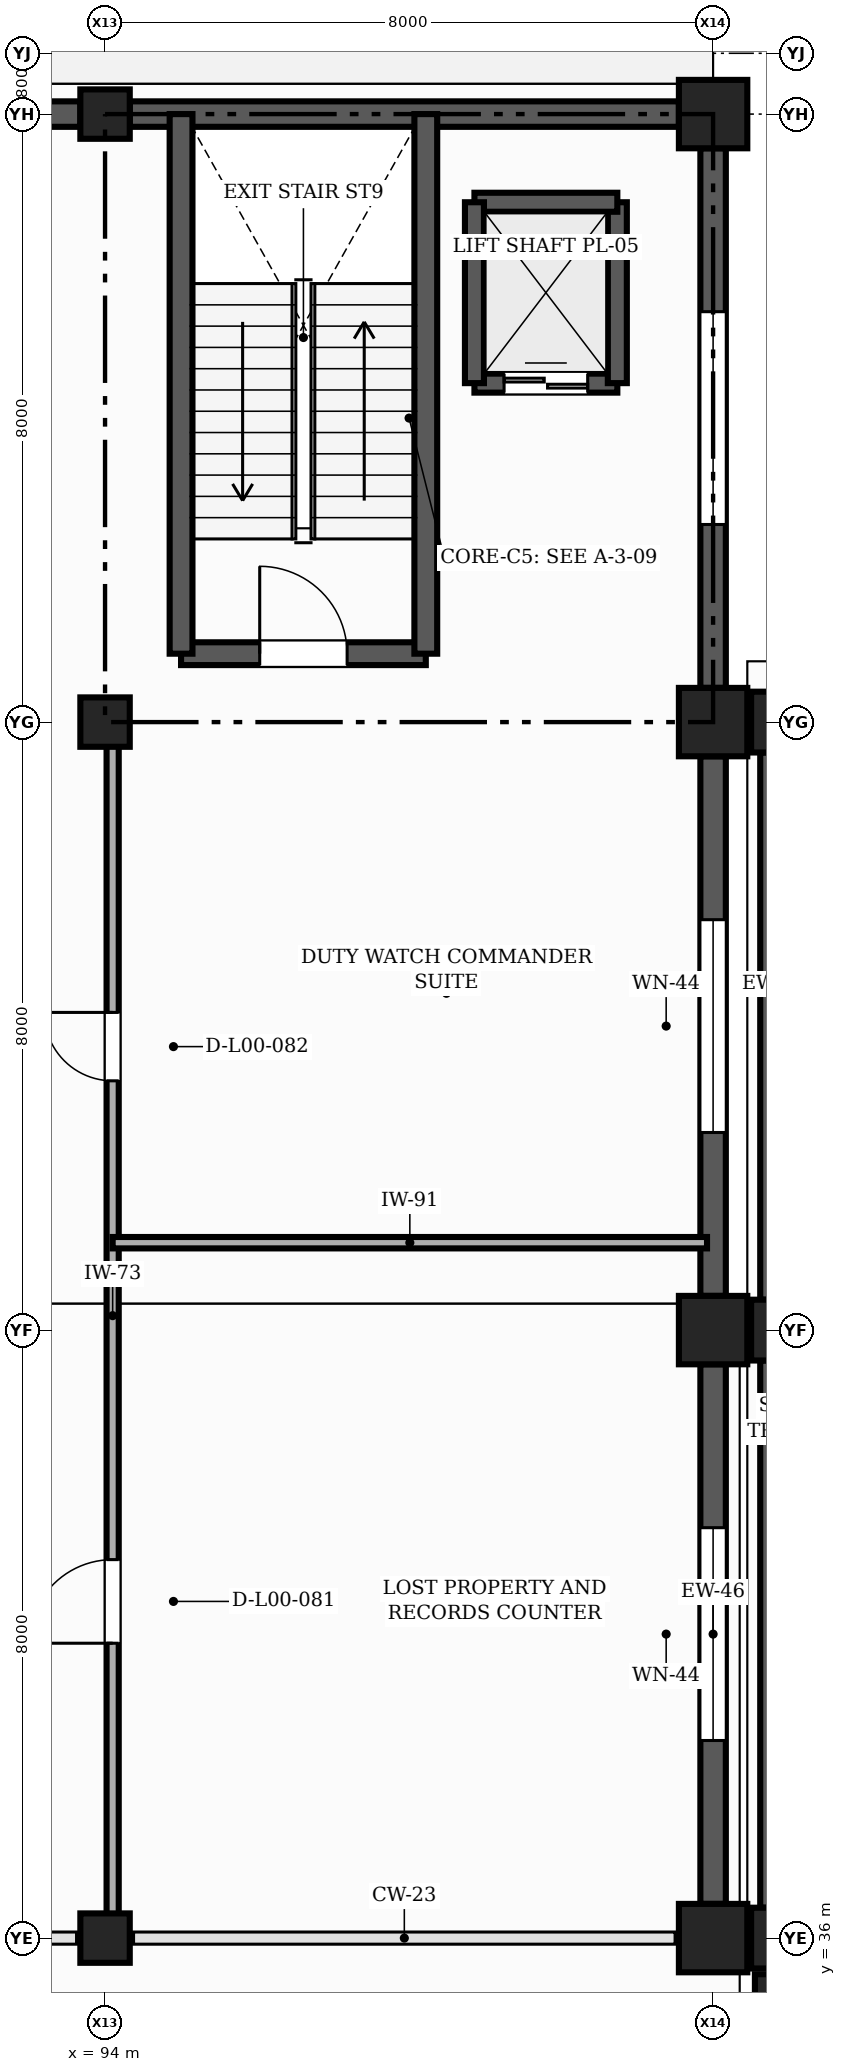
"""IFC4 building model, lengths in metres.
Left out: names, types, materials, properties, quantities, classifications, styles, units other than length and angle.
Written with IfcOpenShell. Run it as: python <this file> out.ifc"""

import sys

from ifc_helpers import new_model, si_unit, direction, frame, frame_2d, origin, origin_2d, place, context, subcontext, project, spatial, rectangle, extrude, element, fill, save


model = new_model("IFC4")
c1 = context("Model", 3, precision=1e-05, world=origin(), true_north=direction((0.0, 1.0)))
c2 = subcontext(c1, "Body", "Model", "MODEL_VIEW")
j1 = project(units=[si_unit("LENGTHUNIT", "METRE"), si_unit("PLANEANGLEUNIT", "RADIAN")], contexts=[c1])
p1 = place(None, origin())
s1 = spatial("IfcSite", under=j1, at=p1, CompositionType="ELEMENT")
p2 = place(p1, origin())
s2 = spatial("IfcBuilding", under=s1, at=p2, CompositionType="ELEMENT")
p3 = place(p2, origin())
s3 = spatial("IfcBuildingStorey", under=s2, at=p3, CompositionType="ELEMENT", Elevation=0.0)
for number, where, z_axis, x_axis in (
    (1, (94.0, 36.0, 0.0), (0.0, 0.0, 1.0), (1.0, 0.0, 0.0)),
    (2, (94.0, 52.0, 0.0), (0.0, 0.0, 1.0), (1.0, 0.0, 0.0)),
    (3, (94.0, 60.0, 0.0), (0.0, 0.0, 1.0), (1.0, 0.0, 0.0)),
):
    element("IfcColumn", number, at=place(p3, frame(where, z_axis=z_axis, x_axis=x_axis)), inside=s3, PredefinedType="COLUMN", context=c2, shape_type="SweptSolid", body=[
        extrude(rectangle(XDim=0.65, YDim=0.65, at=origin_2d()), origin(), (0.0, 0.0, 1.0), 4.8),
    ])
for number, where, z_axis, x_axis in (
    (4, (102.0, 36.0, 0.0), (0.0, 0.0, 1.0), (1.0, 0.0, 0.0)),
    (5, (102.0, 44.0, 0.0), (0.0, 0.0, 1.0), (1.0, 0.0, 0.0)),
    (6, (102.0, 52.0, 0.0), (0.0, 0.0, 1.0), (1.0, 0.0, 0.0)),
    (7, (102.0, 60.0, 0.0), (0.0, 0.0, 1.0), (1.0, 0.0, 0.0)),
):
    element("IfcColumn", number, at=place(p3, frame(where, z_axis=z_axis, x_axis=x_axis)), inside=s3, PredefinedType="COLUMN", context=c2, shape_type="SweptSolid", body=[
        extrude(rectangle(XDim=0.9, YDim=0.9, at=origin_2d()), origin(), (0.0, 0.0, 1.0), 4.8),
    ])
p4 = place(p3, frame((102.8, 35.2, -0.5), z_axis=(0.0, 0.0, 1.0), x_axis=(1.0, 0.0, 0.0)))
e8 = element("IfcColumn", 8, at=p4, inside=s3, PredefinedType="COLUMN", context=c2, shape_type="SweptSolid", body=[
    extrude(rectangle(XDim=0.5, YDim=0.65, at=origin_2d()), origin(), (0.0, 0.0, 1.0), 5.3),
])
for number, where, z_axis, x_axis in (
    (9, (102.8, 36.0, -0.5), (0.0, 0.0, 1.0), (1.0, 0.0, 0.0)),
    (10, (102.8, 44.0, -0.5), (0.0, 0.0, 1.0), (1.0, 0.0, 0.0)),
    (11, (102.8, 52.0, -0.5), (0.0, 0.0, 1.0), (1.0, 0.0, 0.0)),
):
    element("IfcColumn", number, at=place(p3, frame(where, z_axis=z_axis, x_axis=x_axis)), inside=s3, PredefinedType="COLUMN", context=c2, shape_type="SweptSolid", body=[
        extrude(rectangle(XDim=0.6, YDim=0.8, at=origin_2d()), origin(), (0.0, 0.0, 1.0), 5.3),
    ])
p5 = place(p3, frame((102.0, 36.45, -0.42), z_axis=(0.0, 0.0, 1.0), x_axis=(0.0, 1.0, 0.0)))
e12 = element("IfcWall", 12, at=p5, inside=s3, PredefinedType="SOLIDWALL", context=c2, shape_type="SweptSolid", body=[
    extrude(rectangle(XDim=7.1, YDim=0.335, at=frame_2d((3.55, 0.0))), origin(), (0.0, 0.0, 1.0), 4.3),
])
p6 = place(p5, frame((2.15, 0.0, 1.32)))
e13 = element("IfcOpeningElement", 13, at=p6, cuts=e12, PredefinedType="OPENING", context=c2, shape_type="SweptSolid", body=[
    extrude(rectangle(XDim=2.8, YDim=1.8, at=frame_2d((1.4, 0.9))), frame((0.0, 0.177, 0.0), z_axis=(0.0, -1.0, 0.0), x_axis=(1.0, 0.0, 0.0)), (0.0, 0.0, 1.0), 0.355),
])
p7 = place(p3, frame((102.0, 44.45, 0.0), z_axis=(0.0, 0.0, 1.0), x_axis=(0.0, 1.0, 0.0)))
e14 = element("IfcWall", 14, at=p7, inside=s3, PredefinedType="SOLIDWALL", context=c2, shape_type="SweptSolid", body=[
    extrude(rectangle(XDim=7.1, YDim=0.335, at=frame_2d((3.55, 0.0))), origin(), (0.0, 0.0, 1.0), 3.88),
])
p8 = place(p7, frame((2.15, 0.0, 0.9)))
e15 = element("IfcOpeningElement", 15, at=p8, cuts=e14, PredefinedType="OPENING", context=c2, shape_type="SweptSolid", body=[
    extrude(rectangle(XDim=2.8, YDim=1.8, at=frame_2d((1.4, 0.9))), frame((0.0, 0.177, 0.0), z_axis=(0.0, -1.0, 0.0), x_axis=(1.0, 0.0, 0.0)), (0.0, 0.0, 1.0), 0.355),
])
p9 = place(p3, frame((102.0, 52.45, 0.0), z_axis=(0.0, 0.0, 1.0), x_axis=(0.0, 1.0, 0.0)))
e16 = element("IfcWall", 16, at=p9, inside=s3, PredefinedType="SOLIDWALL", context=c2, shape_type="SweptSolid", body=[
    extrude(rectangle(XDim=7.1, YDim=0.335, at=frame_2d((3.55, 0.0))), origin(), (0.0, 0.0, 1.0), 3.88),
])
p10 = place(p9, frame((2.15, 0.0, 0.9)))
e17 = element("IfcOpeningElement", 17, at=p10, cuts=e16, PredefinedType="OPENING", context=c2, shape_type="SweptSolid", body=[
    extrude(rectangle(XDim=2.8, YDim=1.8, at=frame_2d((1.4, 0.9))), frame((0.0, 0.177, 0.0), z_axis=(0.0, -1.0, 0.0), x_axis=(1.0, 0.0, 0.0)), (0.0, 0.0, 1.0), 0.355),
])
p11 = place(p3, frame((101.55, 60.0, 0.0), z_axis=(0.0, 0.0, 1.0), x_axis=(-1.0, 0.0, 0.0)))
e18 = element("IfcWall", 18, at=p11, inside=s3, PredefinedType="SOLIDWALL", context=c2, shape_type="SweptSolid", body=[
    extrude(rectangle(XDim=7.225, YDim=0.335, at=frame_2d((3.613, 0.0))), origin(), (0.0, 0.0, 1.0), 4.53),
])
p12 = place(p3, frame((93.675, 60.0, 0.0), z_axis=(0.0, 0.0, 1.0), x_axis=(-1.0, 0.0, 0.0)))
e19 = element("IfcWall", 19, at=p12, inside=s3, PredefinedType="SOLIDWALL", context=c2, shape_type="SweptSolid", body=[
    extrude(rectangle(XDim=7.225, YDim=0.335, at=frame_2d((3.613, 0.0))), origin(), (0.0, 0.0, 1.0), 3.78),
])
p13 = place(p12, frame((2.012, 0.0, 0.9)))
e20 = element("IfcOpeningElement", 20, at=p13, cuts=e19, PredefinedType="OPENING", context=c2, shape_type="SweptSolid", body=[
    extrude(rectangle(XDim=3.2, YDim=1.6, at=frame_2d((1.6, 0.8))), frame((0.0, 0.177, 0.0), z_axis=(0.0, -1.0, 0.0), x_axis=(1.0, 0.0, 0.0)), (0.0, 0.0, 1.0), 0.355),
])
for number, where, z_axis, x_axis in (
    (21, (102.8, 51.6, -0.42), (0.0, 0.0, 1.0), (0.0, -1.0, 0.0)),
    (22, (102.8, 43.6, -0.42), (0.0, 0.0, 1.0), (0.0, -1.0, 0.0)),
):
    element("IfcWall", number, at=place(p3, frame(where, z_axis=z_axis, x_axis=x_axis)), inside=s3, PredefinedType="SOLIDWALL", context=c2, shape_type="SweptSolid", body=[
        extrude(rectangle(XDim=7.2, YDim=0.36, at=frame_2d((3.6, 0.0))), origin(), (0.0, 0.0, 1.0), 4.23),
    ])
p14 = place(p3, frame((95.0, 52.9, 0.0), z_axis=(0.0, 0.0, 1.0), x_axis=(1.0, 0.0, 0.0)))
e23 = element("IfcWall", 23, at=p14, inside=s3, PredefinedType="SHEAR", context=c2, shape_type="SweptSolid", body=[
    extrude(rectangle(XDim=3.22, YDim=0.3, at=frame_2d((1.61, 0.0))), origin(), (0.0, 0.0, 1.0), 4.8),
])
p15 = place(p14, frame((1.035, 0.0, 0.0)))
e24 = element("IfcOpeningElement", 24, at=p15, cuts=e23, PredefinedType="OPENING", context=c2, shape_type="SweptSolid", body=[
    extrude(rectangle(XDim=1.15, YDim=2.15, at=frame_2d((0.575, 1.075))), frame((0.0, 0.16, 0.0), z_axis=(0.0, -1.0, 0.0), x_axis=(1.0, 0.0, 0.0)), (0.0, 0.0, 1.0), 0.32),
])
for number, where, z_axis, x_axis in (
    (25, (98.22, 52.9, 0.0), (0.0, 0.0, 1.0), (0.0, 1.0, 0.0)),
    (26, (95.0, 60.0, 0.0), (0.0, 0.0, 1.0), (0.0, -1.0, 0.0)),
):
    element("IfcWall", number, at=place(p3, frame(where, z_axis=z_axis, x_axis=x_axis)), inside=s3, PredefinedType="SHEAR", context=c2, shape_type="SweptSolid", body=[
        extrude(rectangle(XDim=7.1, YDim=0.3, at=frame_2d((3.55, 0.0))), origin(), (0.0, 0.0, 1.0), 4.8),
    ])
p16 = place(p3, frame((98.86, 56.46, -0.5), z_axis=(0.0, 0.0, 1.0), x_axis=(1.0, 0.0, 0.0)))
e27 = element("IfcWall", 27, at=p16, inside=s3, PredefinedType="SHEAR", context=c2, shape_type="SweptSolid", body=[
    extrude(rectangle(XDim=1.88, YDim=0.25, at=frame_2d((0.94, 0.0))), origin(), (0.0, 0.0, 1.0), 5.3),
])
p17 = place(p16, frame((0.39, 0.0, 0.5)))
e28 = element("IfcOpeningElement", 28, at=p17, cuts=e27, PredefinedType="OPENING", context=c2, shape_type="SweptSolid", body=[
    extrude(rectangle(XDim=1.1, YDim=2.2, at=frame_2d((0.55, 1.1))), frame((0.0, 0.135, 0.0), z_axis=(0.0, -1.0, 0.0), x_axis=(1.0, 0.0, 0.0)), (0.0, 0.0, 1.0), 0.27),
])
p18 = place(p3, frame((100.74, 56.46, -0.5), z_axis=(0.0, 0.0, 1.0), x_axis=(0.0, 1.0, 0.0)))
e29 = element("IfcWall", 29, at=p18, inside=s3, PredefinedType="SHEAR", context=c2, shape_type="SweptSolid", body=[
    extrude(rectangle(XDim=2.38, YDim=0.25, at=frame_2d((1.19, 0.0))), origin(), (0.0, 0.0, 1.0), 5.3),
])
p19 = place(p3, frame((100.74, 58.84, -0.5), z_axis=(0.0, 0.0, 1.0), x_axis=(-1.0, 0.0, 0.0)))
e30 = element("IfcWall", 30, at=p19, inside=s3, PredefinedType="SHEAR", context=c2, shape_type="SweptSolid", body=[
    extrude(rectangle(XDim=1.88, YDim=0.25, at=frame_2d((0.94, 0.0))), origin(), (0.0, 0.0, 1.0), 5.3),
])
p20 = place(p3, frame((98.86, 58.84, -0.5), z_axis=(0.0, 0.0, 1.0), x_axis=(0.0, -1.0, 0.0)))
e31 = element("IfcWall", 31, at=p20, inside=s3, PredefinedType="SHEAR", context=c2, shape_type="SweptSolid", body=[
    extrude(rectangle(XDim=2.38, YDim=0.25, at=frame_2d((1.19, 0.0))), origin(), (0.0, 0.0, 1.0), 5.3),
])
p21 = place(p3, frame((94.1, 36.08, 0.0), z_axis=(0.0, 0.0, 1.0), x_axis=(0.0, 1.0, 0.0)))
e32 = element("IfcWall", 32, at=p21, inside=s3, PredefinedType="PARTITIONING", context=c2, shape_type="SweptSolid", body=[
    extrude(rectangle(XDim=16.22, YDim=0.16, at=frame_2d((8.11, 0.0))), origin(), (0.0, 0.0, 1.0), 3.565),
])
p22 = place(p21, frame((3.8, 0.0, 0.0)))
e33 = element("IfcOpeningElement", 33, at=p22, cuts=e32, PredefinedType="OPENING", context=c2, shape_type="SweptSolid", body=[
    extrude(rectangle(XDim=1.1, YDim=2.1, at=frame_2d((0.55, 1.05))), frame((0.0, 0.09, 0.0), z_axis=(0.0, -1.0, 0.0), x_axis=(1.0, 0.0, 0.0)), (0.0, 0.0, 1.0), 0.18),
])
p23 = place(p21, frame((11.2, 0.0, 0.0)))
e34 = element("IfcOpeningElement", 34, at=p23, cuts=e32, PredefinedType="OPENING", context=c2, shape_type="SweptSolid", body=[
    extrude(rectangle(XDim=0.9, YDim=2.1, at=frame_2d((0.45, 1.05))), frame((0.0, 0.09, 0.0), z_axis=(0.0, -1.0, 0.0), x_axis=(1.0, 0.0, 0.0)), (0.0, 0.0, 1.0), 0.18),
])
p24 = place(p3, frame((94.1, 45.15, 0.0), z_axis=(0.0, 0.0, 1.0), x_axis=(1.0, 0.0, 0.0)))
e35 = element("IfcWall", 35, at=p24, inside=s3, PredefinedType="PARTITIONING", context=c2, shape_type="SweptSolid", body=[
    extrude(rectangle(XDim=7.82, YDim=0.15, at=frame_2d((3.91, 0.0))), origin(), (0.0, 0.0, 1.0), 3.565),
])
p25 = place(p6, origin())
e36 = element("IfcWindow", 36, at=p25, inside=s3, PartitioningType="SINGLE_PANEL", PredefinedType="WINDOW", context=c2, shape_type="SweptSolid", body=[
    extrude(rectangle(XDim=2.8, YDim=1.8, at=frame_2d((1.4, 0.9))), frame((0.0, 0.03, 0.0), z_axis=(0.0, -1.0, 0.0), x_axis=(1.0, 0.0, 0.0)), (0.0, 0.0, 1.0), 0.06),
])
fill(e13, e36)
p26 = place(p8, origin())
e37 = element("IfcWindow", 37, at=p26, inside=s3, PartitioningType="SINGLE_PANEL", PredefinedType="WINDOW", context=c2, shape_type="SweptSolid", body=[
    extrude(rectangle(XDim=2.8, YDim=1.8, at=frame_2d((1.4, 0.9))), frame((0.0, 0.03, 0.0), z_axis=(0.0, -1.0, 0.0), x_axis=(1.0, 0.0, 0.0)), (0.0, 0.0, 1.0), 0.06),
])
fill(e15, e37)
p27 = place(p10, origin())
e38 = element("IfcWindow", 38, at=p27, inside=s3, PartitioningType="SINGLE_PANEL", PredefinedType="WINDOW", context=c2, shape_type="SweptSolid", body=[
    extrude(rectangle(XDim=2.8, YDim=1.8, at=frame_2d((1.4, 0.9))), frame((0.0, 0.03, 0.0), z_axis=(0.0, -1.0, 0.0), x_axis=(1.0, 0.0, 0.0)), (0.0, 0.0, 1.0), 0.06),
])
fill(e17, e38)
p28 = place(p15, origin())
e39 = element("IfcDoor", 39, at=p28, inside=s3, OperationType="SINGLE_SWING_LEFT", PredefinedType="DOOR", context=c2, shape_type="SweptSolid", body=[
    extrude(rectangle(XDim=1.15, YDim=2.15, at=frame_2d((0.575, 1.075))), frame((0.0, 0.025, 0.0), z_axis=(0.0, -1.0, 0.0), x_axis=(1.0, 0.0, 0.0)), (0.0, 0.0, 1.0), 0.05),
])
fill(e24, e39)
p29 = place(p17, origin())
e40 = element("IfcDoor", 40, at=p29, inside=s3, OperationType="DOUBLE_DOOR_SLIDING", PredefinedType="DOOR", context=c2, shape_type="SweptSolid", body=[
    extrude(rectangle(XDim=1.1, YDim=2.2, at=frame_2d((0.55, 1.1))), frame((0.0, 0.025, 0.0), z_axis=(0.0, -1.0, 0.0), x_axis=(1.0, 0.0, 0.0)), (0.0, 0.0, 1.0), 0.05),
])
fill(e28, e40)
p30 = place(p22, origin())
e41 = element("IfcDoor", 41, at=p30, inside=s3, OperationType="SINGLE_SWING_LEFT", PredefinedType="DOOR", context=c2, shape_type="SweptSolid", body=[
    extrude(rectangle(XDim=1.1, YDim=2.1, at=frame_2d((0.55, 1.05))), frame((0.0, 0.025, 0.0), z_axis=(0.0, -1.0, 0.0), x_axis=(1.0, 0.0, 0.0)), (0.0, 0.0, 1.0), 0.05),
])
fill(e33, e41)
p31 = place(p23, origin())
e42 = element("IfcDoor", 42, at=p31, inside=s3, OperationType="SINGLE_SWING_RIGHT", PredefinedType="DOOR", context=c2, shape_type="SweptSolid", body=[
    extrude(rectangle(XDim=0.9, YDim=2.1, at=frame_2d((0.45, 1.05))), frame((0.0, 0.025, 0.0), z_axis=(0.0, -1.0, 0.0), x_axis=(1.0, 0.0, 0.0)), (0.0, 0.0, 1.0), 0.05),
])
fill(e34, e42)
save(model, sys.argv[1])
